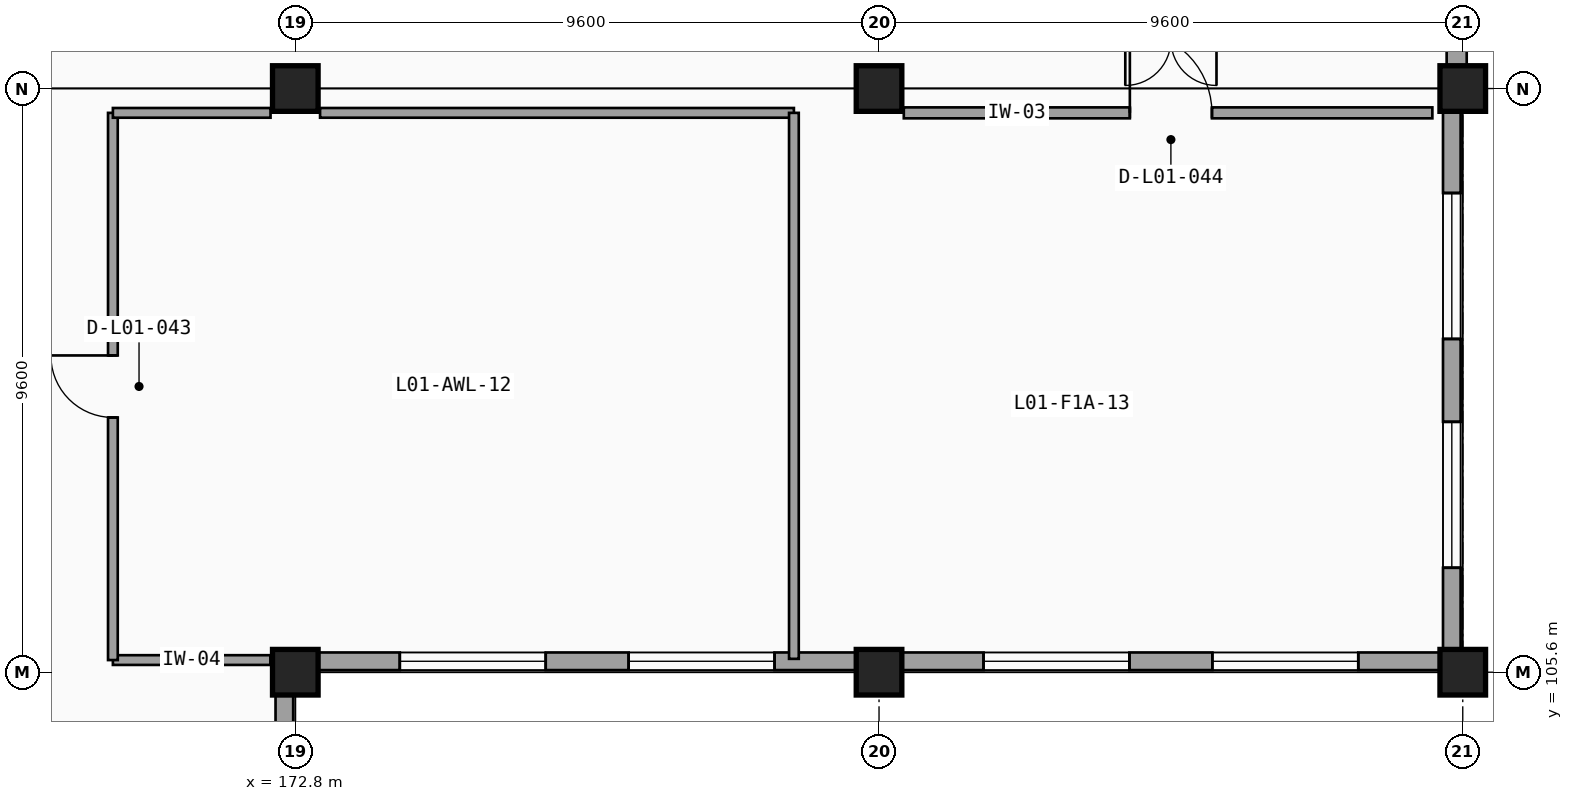
"""IFC4 building model, lengths in metres.
Left out: names, types, materials, properties, quantities, classifications, styles, units other than length and angle.
Written with IfcOpenShell. Run it as: python <this file> out.ifc"""

import sys

from ifc_helpers import new_model, si_unit, direction, frame, frame_2d, origin, origin_2d, place, context, subcontext, project, spatial, rectangle, extrude, element, fill, save


model = new_model("IFC4")
c1 = context("Model", 3, precision=1e-05, world=origin(), true_north=direction((0.0, 1.0)))
c2 = subcontext(c1, "Body", "Model", "MODEL_VIEW")
j1 = project(units=[si_unit("LENGTHUNIT", "METRE"), si_unit("PLANEANGLEUNIT", "RADIAN")], contexts=[c1])
p1 = place(None, origin())
s1 = spatial("IfcSite", under=j1, at=p1, CompositionType="ELEMENT")
p2 = place(p1, origin())
s2 = spatial("IfcBuilding", under=s1, at=p2, CompositionType="ELEMENT")
p3 = place(p2, frame((0.0, 0.0, 4.8)))
s3 = spatial("IfcBuildingStorey", under=s2, at=p3, CompositionType="ELEMENT", Elevation=4.8)
for number, where, z_axis, x_axis in (
    (1, (172.8, 105.6, 0.0), (0.0, 0.0, 1.0), (1.0, 0.0, 0.0)),
    (2, (172.8, 115.2, 0.0), (0.0, 0.0, 1.0), (1.0, 0.0, 0.0)),
    (3, (182.4, 105.6, 0.0), (0.0, 0.0, 1.0), (1.0, 0.0, 0.0)),
    (4, (182.4, 115.2, 0.0), (0.0, 0.0, 1.0), (1.0, 0.0, 0.0)),
    (5, (192.0, 105.6, 0.0), (0.0, 0.0, 1.0), (1.0, 0.0, 0.0)),
    (6, (192.0, 115.2, 0.0), (0.0, 0.0, 1.0), (1.0, 0.0, 0.0)),
):
    element("IfcColumn", number, at=place(p3, frame(where, z_axis=z_axis, x_axis=x_axis)), inside=s3, PredefinedType="COLUMN", context=c2, shape_type="SweptSolid", body=[
        extrude(rectangle(XDim=0.75, YDim=0.75, at=origin_2d()), origin(), (0.0, 0.0, 1.0), 4.8),
    ])
p4 = place(p3, frame((172.62, 96.355, 0.0), z_axis=(0.0, 0.0, 1.0), x_axis=(0.0, 1.0, 0.0)))
e7 = element("IfcWall", 7, at=p4, inside=s3, PredefinedType="SOLIDWALL", context=c2, shape_type="SweptSolid", body=[
    extrude(rectangle(XDim=8.89, YDim=0.29, at=frame_2d((4.445, 0.0))), origin(), (0.0, 0.0, 1.0), 3.913),
])
p5 = place(p4, frame((3.763, 0.0, 0.95), z_axis=(0.0, 0.0, 1.0), x_axis=(-1.0, 0.0, 0.0)))
e8 = element("IfcOpeningElement", 8, at=p5, cuts=e7, PredefinedType="OPENING", context=c2, shape_type="SweptSolid", body=[
    extrude(rectangle(XDim=2.4, YDim=2.2, at=frame_2d((1.2, 1.1))), frame((0.0, 0.155, 0.0), z_axis=(0.0, -1.0, 0.0), x_axis=(1.0, 0.0, 0.0)), (0.0, 0.0, 1.0), 0.31),
])
p6 = place(p4, frame((7.527, 0.0, 0.95), z_axis=(0.0, 0.0, 1.0), x_axis=(-1.0, 0.0, 0.0)))
e9 = element("IfcOpeningElement", 9, at=p6, cuts=e7, PredefinedType="OPENING", context=c2, shape_type="SweptSolid", body=[
    extrude(rectangle(XDim=2.4, YDim=2.2, at=frame_2d((1.2, 1.1))), frame((0.0, 0.155, 0.0), z_axis=(0.0, -1.0, 0.0), x_axis=(1.0, 0.0, 0.0)), (0.0, 0.0, 1.0), 0.31),
])
p7 = place(p3, frame((173.155, 105.78, 0.0), z_axis=(0.0, 0.0, 1.0), x_axis=(1.0, 0.0, 0.0)))
e10 = element("IfcWall", 10, at=p7, inside=s3, PredefinedType="SOLIDWALL", context=c2, shape_type="SweptSolid", body=[
    extrude(rectangle(XDim=8.89, YDim=0.29, at=frame_2d((4.445, 0.0))), origin(), (0.0, 0.0, 1.0), 3.758),
])
p8 = place(p7, frame((3.763, 0.0, 0.95), z_axis=(0.0, 0.0, 1.0), x_axis=(-1.0, 0.0, 0.0)))
e11 = element("IfcOpeningElement", 11, at=p8, cuts=e10, PredefinedType="OPENING", context=c2, shape_type="SweptSolid", body=[
    extrude(rectangle(XDim=2.4, YDim=2.2, at=frame_2d((1.2, 1.1))), frame((0.0, 0.155, 0.0), z_axis=(0.0, -1.0, 0.0), x_axis=(1.0, 0.0, 0.0)), (0.0, 0.0, 1.0), 0.31),
])
p9 = place(p7, frame((7.527, 0.0, 0.95), z_axis=(0.0, 0.0, 1.0), x_axis=(-1.0, 0.0, 0.0)))
e12 = element("IfcOpeningElement", 12, at=p9, cuts=e10, PredefinedType="OPENING", context=c2, shape_type="SweptSolid", body=[
    extrude(rectangle(XDim=2.4, YDim=2.2, at=frame_2d((1.2, 1.1))), frame((0.0, 0.155, 0.0), z_axis=(0.0, -1.0, 0.0), x_axis=(1.0, 0.0, 0.0)), (0.0, 0.0, 1.0), 0.31),
])
p10 = place(p3, frame((182.755, 105.78, 0.0), z_axis=(0.0, 0.0, 1.0), x_axis=(1.0, 0.0, 0.0)))
e13 = element("IfcWall", 13, at=p10, inside=s3, PredefinedType="SOLIDWALL", context=c2, shape_type="SweptSolid", body=[
    extrude(rectangle(XDim=8.89, YDim=0.29, at=frame_2d((4.445, 0.0))), origin(), (0.0, 0.0, 1.0), 3.758),
])
p11 = place(p10, frame((3.763, 0.0, 0.95), z_axis=(0.0, 0.0, 1.0), x_axis=(-1.0, 0.0, 0.0)))
e14 = element("IfcOpeningElement", 14, at=p11, cuts=e13, PredefinedType="OPENING", context=c2, shape_type="SweptSolid", body=[
    extrude(rectangle(XDim=2.4, YDim=2.2, at=frame_2d((1.2, 1.1))), frame((0.0, 0.155, 0.0), z_axis=(0.0, -1.0, 0.0), x_axis=(1.0, 0.0, 0.0)), (0.0, 0.0, 1.0), 0.31),
])
p12 = place(p10, frame((7.527, 0.0, 0.95), z_axis=(0.0, 0.0, 1.0), x_axis=(-1.0, 0.0, 0.0)))
e15 = element("IfcOpeningElement", 15, at=p12, cuts=e13, PredefinedType="OPENING", context=c2, shape_type="SweptSolid", body=[
    extrude(rectangle(XDim=2.4, YDim=2.2, at=frame_2d((1.2, 1.1))), frame((0.0, 0.155, 0.0), z_axis=(0.0, -1.0, 0.0), x_axis=(1.0, 0.0, 0.0)), (0.0, 0.0, 1.0), 0.31),
])
p13 = place(p3, frame((191.82, 105.955, 0.0), z_axis=(0.0, 0.0, 1.0), x_axis=(0.0, 1.0, 0.0)))
e16 = element("IfcWall", 16, at=p13, inside=s3, PredefinedType="SOLIDWALL", context=c2, shape_type="SweptSolid", body=[
    extrude(rectangle(XDim=8.89, YDim=0.29, at=frame_2d((4.445, 0.0))), origin(), (0.0, 0.0, 1.0), 3.593),
])
p14 = place(p13, frame((3.763, 0.0, 0.95), z_axis=(0.0, 0.0, 1.0), x_axis=(-1.0, 0.0, 0.0)))
e17 = element("IfcOpeningElement", 17, at=p14, cuts=e16, PredefinedType="OPENING", context=c2, shape_type="SweptSolid", body=[
    extrude(rectangle(XDim=2.4, YDim=2.2, at=frame_2d((1.2, 1.1))), frame((0.0, 0.155, 0.0), z_axis=(0.0, -1.0, 0.0), x_axis=(1.0, 0.0, 0.0)), (0.0, 0.0, 1.0), 0.31),
])
p15 = place(p13, frame((7.527, 0.0, 0.95), z_axis=(0.0, 0.0, 1.0), x_axis=(-1.0, 0.0, 0.0)))
e18 = element("IfcOpeningElement", 18, at=p15, cuts=e16, PredefinedType="OPENING", context=c2, shape_type="SweptSolid", body=[
    extrude(rectangle(XDim=2.4, YDim=2.2, at=frame_2d((1.2, 1.1))), frame((0.0, 0.155, 0.0), z_axis=(0.0, -1.0, 0.0), x_axis=(1.0, 0.0, 0.0)), (0.0, 0.0, 1.0), 0.31),
])
p16 = place(p3, frame((191.9, 115.555, 0.0), z_axis=(0.0, 0.0, 1.0), x_axis=(0.0, 1.0, 0.0)))
e19 = element("IfcWall", 19, at=p16, inside=s3, PredefinedType="SOLIDWALL", context=c2, shape_type="SweptSolid", body=[
    extrude(rectangle(XDim=8.89, YDim=0.33, at=frame_2d((4.445, 0.0))), origin(), (0.0, 0.0, 1.0), 3.593),
])
p17 = place(p3, frame((172.39, 105.8, 0.0), z_axis=(0.0, 0.0, 1.0), x_axis=(-1.0, 0.0, 0.0)))
e20 = element("IfcWall", 20, at=p17, inside=s3, PredefinedType="PARTITIONING", context=c2, shape_type="SweptSolid", body=[
    extrude(rectangle(XDim=2.59, YDim=0.16, at=frame_2d((1.295, 0.0))), origin(), (0.0, 0.0, 1.0), 3.758),
])
p18 = place(p3, frame((169.8, 105.8, 0.0), z_axis=(0.0, 0.0, 1.0), x_axis=(0.0, 1.0, 0.0)))
e21 = element("IfcWall", 21, at=p18, inside=s3, PredefinedType="PARTITIONING", context=c2, shape_type="SweptSolid", body=[
    extrude(rectangle(XDim=9.0, YDim=0.16, at=frame_2d((4.5, 0.0))), origin(), (0.0, 0.0, 1.0), 4.063),
])
p19 = place(p18, frame((3.99, 0.0, 0.0), z_axis=(0.0, 0.0, 1.0), x_axis=(1.0, 0.0, 0.0)))
e22 = element("IfcOpeningElement", 22, at=p19, cuts=e21, PredefinedType="OPENING", context=c2, shape_type="SweptSolid", body=[
    extrude(rectangle(XDim=1.02, YDim=2.15, at=frame_2d((0.51, 1.075))), frame((0.0, 0.09, 0.0), z_axis=(0.0, -1.0, 0.0), x_axis=(1.0, 0.0, 0.0)), (0.0, 0.0, 1.0), 0.18),
])
p20 = place(p3, frame((169.8, 114.8, 0.0), z_axis=(0.0, 0.0, 1.0), x_axis=(1.0, 0.0, 0.0)))
e23 = element("IfcWall", 23, at=p20, inside=s3, PredefinedType="PARTITIONING", context=c2, shape_type="SweptSolid", body=[
    extrude(rectangle(XDim=2.593, YDim=0.16, at=frame_2d((1.296, 0.0))), origin(), (0.0, 0.0, 1.0), 4.52),
])
p21 = place(p3, frame((173.207, 114.8, 0.0), z_axis=(0.0, 0.0, 1.0), x_axis=(1.0, 0.0, 0.0)))
e24 = element("IfcWall", 24, at=p21, inside=s3, PredefinedType="PARTITIONING", context=c2, shape_type="SweptSolid", body=[
    extrude(rectangle(XDim=7.793, YDim=0.16, at=frame_2d((3.896, 0.0))), origin(), (0.0, 0.0, 1.0), 4.52),
])
p22 = place(p3, frame((181.0, 114.8, 0.0), z_axis=(0.0, 0.0, 1.0), x_axis=(0.0, -1.0, 0.0)))
e25 = element("IfcWall", 25, at=p22, inside=s3, PredefinedType="PARTITIONING", context=c2, shape_type="SweptSolid", body=[
    extrude(rectangle(XDim=8.98, YDim=0.16, at=frame_2d((4.49, 0.0))), origin(), (0.0, 0.0, 1.0), 4.063),
])
p23 = place(p3, frame((182.807, 114.8, 0.0), z_axis=(0.0, 0.0, 1.0), x_axis=(1.0, 0.0, 0.0)))
e26 = element("IfcWall", 26, at=p23, inside=s3, PredefinedType="PARTITIONING", context=c2, shape_type="SweptSolid", body=[
    extrude(rectangle(XDim=8.693, YDim=0.18, at=frame_2d((4.346, 0.0))), origin(), (0.0, 0.0, 1.0), 4.52),
])
p24 = place(p23, frame((3.718, 0.0, 0.0), z_axis=(0.0, 0.0, 1.0), x_axis=(1.0, 0.0, 0.0)))
e27 = element("IfcOpeningElement", 27, at=p24, cuts=e26, PredefinedType="OPENING", context=c2, shape_type="SweptSolid", body=[
    extrude(rectangle(XDim=1.35, YDim=2.25, at=frame_2d((0.675, 1.125))), frame((0.0, 0.1, 0.0), z_axis=(0.0, -1.0, 0.0), x_axis=(1.0, 0.0, 0.0)), (0.0, 0.0, 1.0), 0.2),
])
p25 = place(p8, origin())
e28 = element("IfcWindow", 28, at=p25, inside=s3, PartitioningType="SINGLE_PANEL", PredefinedType="WINDOW", context=c2, shape_type="SweptSolid", body=[
    extrude(rectangle(XDim=2.4, YDim=2.2, at=frame_2d((1.2, 1.1))), frame((0.0, 0.03, 0.0), z_axis=(0.0, -1.0, 0.0), x_axis=(1.0, 0.0, 0.0)), (0.0, 0.0, 1.0), 0.06),
])
fill(e11, e28)
p26 = place(p9, origin())
e29 = element("IfcWindow", 29, at=p26, inside=s3, PartitioningType="SINGLE_PANEL", PredefinedType="WINDOW", context=c2, shape_type="SweptSolid", body=[
    extrude(rectangle(XDim=2.4, YDim=2.2, at=frame_2d((1.2, 1.1))), frame((0.0, 0.03, 0.0), z_axis=(0.0, -1.0, 0.0), x_axis=(1.0, 0.0, 0.0)), (0.0, 0.0, 1.0), 0.06),
])
fill(e12, e29)
p27 = place(p11, origin())
e30 = element("IfcWindow", 30, at=p27, inside=s3, PartitioningType="SINGLE_PANEL", PredefinedType="WINDOW", context=c2, shape_type="SweptSolid", body=[
    extrude(rectangle(XDim=2.4, YDim=2.2, at=frame_2d((1.2, 1.1))), frame((0.0, 0.03, 0.0), z_axis=(0.0, -1.0, 0.0), x_axis=(1.0, 0.0, 0.0)), (0.0, 0.0, 1.0), 0.06),
])
fill(e14, e30)
p28 = place(p12, origin())
e31 = element("IfcWindow", 31, at=p28, inside=s3, PartitioningType="SINGLE_PANEL", PredefinedType="WINDOW", context=c2, shape_type="SweptSolid", body=[
    extrude(rectangle(XDim=2.4, YDim=2.2, at=frame_2d((1.2, 1.1))), frame((0.0, 0.03, 0.0), z_axis=(0.0, -1.0, 0.0), x_axis=(1.0, 0.0, 0.0)), (0.0, 0.0, 1.0), 0.06),
])
fill(e15, e31)
p29 = place(p14, origin())
e32 = element("IfcWindow", 32, at=p29, inside=s3, PartitioningType="SINGLE_PANEL", PredefinedType="WINDOW", context=c2, shape_type="SweptSolid", body=[
    extrude(rectangle(XDim=2.4, YDim=2.2, at=frame_2d((1.2, 1.1))), frame((0.0, 0.03, 0.0), z_axis=(0.0, -1.0, 0.0), x_axis=(1.0, 0.0, 0.0)), (0.0, 0.0, 1.0), 0.06),
])
fill(e17, e32)
p30 = place(p15, origin())
e33 = element("IfcWindow", 33, at=p30, inside=s3, PartitioningType="SINGLE_PANEL", PredefinedType="WINDOW", context=c2, shape_type="SweptSolid", body=[
    extrude(rectangle(XDim=2.4, YDim=2.2, at=frame_2d((1.2, 1.1))), frame((0.0, 0.03, 0.0), z_axis=(0.0, -1.0, 0.0), x_axis=(1.0, 0.0, 0.0)), (0.0, 0.0, 1.0), 0.06),
])
fill(e18, e33)
p31 = place(p19, origin())
e34 = element("IfcDoor", 34, at=p31, inside=s3, OperationType="SINGLE_SWING_RIGHT", PredefinedType="DOOR", context=c2, shape_type="SweptSolid", body=[
    extrude(rectangle(XDim=1.02, YDim=2.15, at=frame_2d((0.51, 1.075))), frame((0.0, 0.025, 0.0), z_axis=(0.0, -1.0, 0.0), x_axis=(1.0, 0.0, 0.0)), (0.0, 0.0, 1.0), 0.05),
])
fill(e22, e34)
p32 = place(p24, origin())
e35 = element("IfcDoor", 35, at=p32, inside=s3, OperationType="SINGLE_SWING_LEFT", PredefinedType="DOOR", context=c2, shape_type="SweptSolid", body=[
    extrude(rectangle(XDim=1.35, YDim=2.25, at=frame_2d((0.675, 1.125))), frame((0.0, 0.025, 0.0), z_axis=(0.0, -1.0, 0.0), x_axis=(1.0, 0.0, 0.0)), (0.0, 0.0, 1.0), 0.05),
])
fill(e27, e35)
save(model, sys.argv[1])
